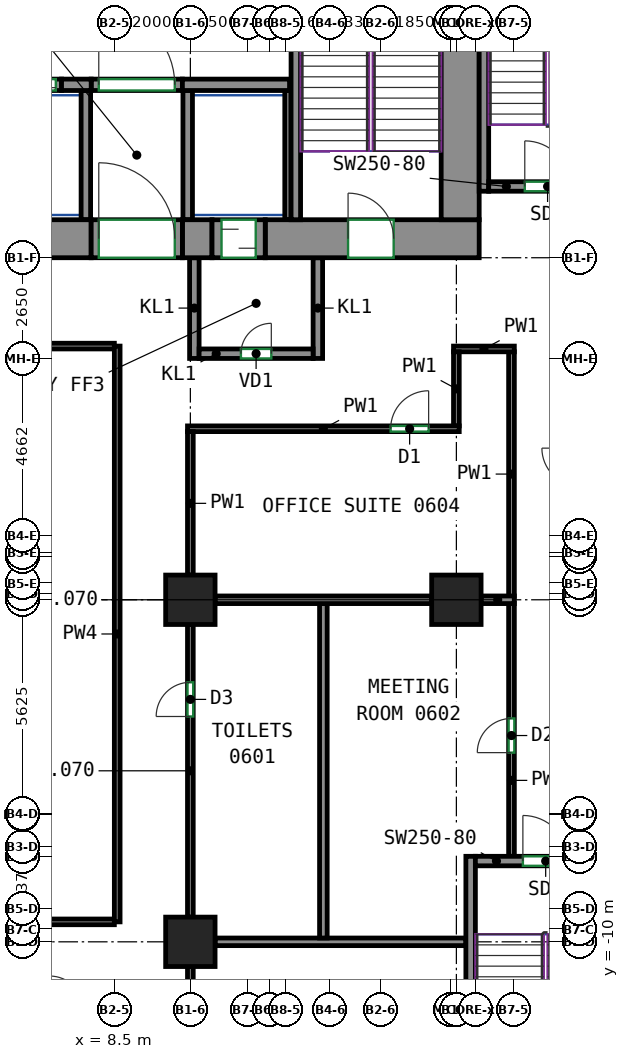
"""IFC4 building model, lengths in metres.
Left out: names, types, materials, properties, quantities, classifications, styles, units other than length and angle.
Written with IfcOpenShell. Run it as: python <this file> out.ifc"""

import sys

from ifc_helpers import new_model, si_unit, direction, frame, frame_2d, origin, origin_2d, place, context, subcontext, project, spatial, rectangle, extrude, source, transform, mapped, element, fill, save


model = new_model("IFC4")
c1 = context("Model", 3, precision=1e-05, world=origin(), true_north=direction((0.0, 1.0)))
c2 = subcontext(c1, "Body", "Model", "MODEL_VIEW")
j1 = project(units=[si_unit("LENGTHUNIT", "METRE"), si_unit("PLANEANGLEUNIT", "RADIAN")], contexts=[c1])
p1 = place(None, origin())
s1 = spatial("IfcSite", under=j1, at=p1, CompositionType="ELEMENT")
p2 = place(p1, origin())
s2 = spatial("IfcBuilding", under=s1, at=p2, CompositionType="ELEMENT")
p3 = place(p2, frame((0.0, 0.0, 31.0)))
s3 = spatial("IfcBuildingStorey", under=s2, at=p3, CompositionType="ELEMENT", Elevation=31.0)
m1 = source(origin(), c2, "Body", "SweptSolid", [
    extrude(rectangle(XDim=1.3, YDim=1.3, at=origin_2d()), origin(), (0.0, 0.0, 1.0), 3.72),
])
for number, where, z_axis, x_axis in (
    (1, (10.5, -10.0, 0.0), (0.0, 0.0, 1.0), (1.0, 0.0, 0.0)),
    (2, (10.5, -1.0, 0.0), (0.0, 0.0, 1.0), (1.0, 0.0, 0.0)),
    (3, (17.5, -1.0, 0.0), (0.0, 0.0, 1.0), (1.0, 0.0, 0.0)),
):
    element("IfcColumn", number, at=place(p3, frame(where, z_axis=z_axis, x_axis=x_axis)), inside=s3, PredefinedType="COLUMN", context=c2, shape_type="MappedRepresentation", body=[
        mapped(m1, transform((0.0, 0.0, 0.0))),
    ])
m2 = source(origin(), c2, "Body", "SweptSolid", [
    extrude(rectangle(XDim=14.18, YDim=1.0, at=frame_2d((7.09, 0.0))), origin(), (0.0, 0.0, 1.0), 3.72),
])
p4 = place(p3, frame((-6.29, 8.5, 0.0), z_axis=(0.0, 0.0, 1.0), x_axis=(1.0, 0.0, 0.0)))
e4 = element("IfcWall", 4, at=p4, inside=s3, PredefinedType="SHEAR", context=c2, shape_type="MappedRepresentation", body=[
    mapped(m2, transform((0.0, 0.0, 0.0))),
])
m3 = source(origin(), c2, "Body", "SweptSolid", [
    extrude(rectangle(XDim=0.78, YDim=1.0, at=frame_2d((0.39, 0.0))), origin(), (0.0, 0.0, 1.0), 3.72),
])
p5 = place(p3, frame((10.29, 8.5, 0.0), z_axis=(0.0, 0.0, 1.0), x_axis=(1.0, 0.0, 0.0)))
e5 = element("IfcWall", 5, at=p5, inside=s3, PredefinedType="SHEAR", context=c2, shape_type="MappedRepresentation", body=[
    mapped(m3, transform((0.0, 0.0, 0.0))),
])
m4 = source(origin(), c2, "Body", "SweptSolid", [
    extrude(rectangle(XDim=5.63, YDim=1.0, at=frame_2d((2.815, 0.0))), origin(), (0.0, 0.0, 1.0), 3.72),
])
p6 = place(p3, frame((12.47, 8.5, 0.0), z_axis=(0.0, 0.0, 1.0), x_axis=(1.0, 0.0, 0.0)))
e6 = element("IfcWall", 6, at=p6, inside=s3, PredefinedType="SHEAR", context=c2, shape_type="MappedRepresentation", body=[
    mapped(m4, transform((0.0, 0.0, 0.0))),
])
p7 = place(p6, frame((2.18, 0.0, 0.0)))
e7 = element("IfcOpeningElement", 7, at=p7, cuts=e6, PredefinedType="OPENING", context=c2, shape_type="SweptSolid", body=[
    extrude(rectangle(XDim=1.2, YDim=2.1, at=frame_2d((0.6, 1.05))), frame((0.0, 0.51, 0.0), z_axis=(0.0, -1.0, 0.0), x_axis=(1.0, 0.0, 0.0)), (0.0, 0.0, 1.0), 1.02),
])
m5 = source(origin(), c2, "Body", "SweptSolid", [
    extrude(rectangle(XDim=12.0, YDim=1.0, at=frame_2d((6.0, 0.0))), origin(), (0.0, 0.0, 1.0), 3.72),
])
p8 = place(p3, frame((17.6, 9.0, 0.0), z_axis=(0.0, 0.0, 1.0), x_axis=(0.0, 1.0, 0.0)))
e8 = element("IfcWall", 8, at=p8, inside=s3, PredefinedType="SHEAR", context=c2, shape_type="MappedRepresentation", body=[
    mapped(m5, transform((0.0, 0.0, 0.0))),
])
m6 = source(origin(), c2, "Body", "SweptSolid", [
    extrude(rectangle(XDim=7.75, YDim=0.25, at=frame_2d((3.875, 0.0))), origin(), (0.0, 0.0, 1.0), 3.72),
])
p9 = place(p3, frame((13.275, 9.0, 0.0), z_axis=(0.0, 0.0, 1.0), x_axis=(0.0, 1.0, 0.0)))
e9 = element("IfcWall", 9, at=p9, inside=s3, PredefinedType="SHEAR", context=c2, shape_type="MappedRepresentation", body=[
    mapped(m6, transform((0.0, 0.0, 0.0))),
])
m7 = source(origin(), c2, "Body", "SweptSolid", [
    extrude(rectangle(XDim=8.0, YDim=0.25, at=frame_2d((4.0, 0.0))), origin(), (0.0, 0.0, 1.0), 3.72),
])
p10 = place(p3, frame((17.875, -15.75, 0.0), z_axis=(0.0, 0.0, 1.0), x_axis=(0.0, 1.0, 0.0)))
e10 = element("IfcWall", 10, at=p10, inside=s3, PredefinedType="SHEAR", context=c2, shape_type="MappedRepresentation", body=[
    mapped(m7, transform((0.0, 0.0, 0.0))),
])
m8 = source(origin(), c2, "Body", "SweptSolid", [
    extrude(rectangle(XDim=3.7, YDim=0.25, at=frame_2d((1.85, 0.0))), origin(), (0.0, 0.0, 1.0), 3.72),
])
p11 = place(p3, frame((18.0, -7.875, 0.0), z_axis=(0.0, 0.0, 1.0), x_axis=(1.0, 0.0, 0.0)))
e11 = element("IfcWall", 11, at=p11, inside=s3, PredefinedType="SHEAR", context=c2, shape_type="MappedRepresentation", body=[
    mapped(m8, transform((0.0, 0.0, 0.0))),
])
p12 = place(p11, frame((1.25, 0.0, 0.0)))
e12 = element("IfcOpeningElement", 12, at=p12, cuts=e11, PredefinedType="OPENING", context=c2, shape_type="SweptSolid", body=[
    extrude(rectangle(XDim=1.2, YDim=2.1, at=frame_2d((0.6, 1.05))), frame((0.0, 0.135, 0.0), z_axis=(0.0, -1.0, 0.0), x_axis=(1.0, 0.0, 0.0)), (0.0, 0.0, 1.0), 0.27),
])
p13 = place(p3, frame((18.225, 9.75, 0.0), z_axis=(0.0, 0.0, 1.0), x_axis=(0.0, 1.0, 0.0)))
e13 = element("IfcWall", 13, at=p13, inside=s3, PredefinedType="SHEAR", context=c2, shape_type="MappedRepresentation", body=[
    mapped(m7, transform((0.0, 0.0, 0.0))),
])
m9 = source(origin(), c2, "Body", "SweptSolid", [
    extrude(rectangle(XDim=3.1, YDim=0.25, at=frame_2d((1.55, 0.0))), origin(), (0.0, 0.0, 1.0), 3.72),
])
p14 = place(p3, frame((18.35, 9.875, 0.0), z_axis=(0.0, 0.0, 1.0), x_axis=(1.0, 0.0, 0.0)))
e14 = element("IfcWall", 14, at=p14, inside=s3, PredefinedType="SHEAR", context=c2, shape_type="MappedRepresentation", body=[
    mapped(m9, transform((0.0, 0.0, 0.0))),
])
p15 = place(p14, frame((0.95, 0.0, 0.0)))
e15 = element("IfcOpeningElement", 15, at=p15, cuts=e14, PredefinedType="OPENING", context=c2, shape_type="SweptSolid", body=[
    extrude(rectangle(XDim=1.2, YDim=2.1, at=frame_2d((0.6, 1.05))), frame((0.0, 0.135, 0.0), z_axis=(0.0, -1.0, 0.0), x_axis=(1.0, 0.0, 0.0)), (0.0, 0.0, 1.0), 0.27),
])
m10 = source(origin(), c2, "Body", "SweptSolid", [
    extrude(rectangle(XDim=0.78, YDim=0.3, at=frame_2d((0.39, 0.0))), origin(), (0.0, 0.0, 1.0), 3.72),
])
p16 = place(p3, frame((7.11, 12.55, 0.0), z_axis=(0.0, 0.0, 1.0), x_axis=(1.0, 0.0, 0.0)))
e16 = element("IfcWall", 16, at=p16, inside=s3, PredefinedType="SHEAR", context=c2, shape_type="MappedRepresentation", body=[
    mapped(m10, transform((0.0, 0.0, 0.0))),
])
m11 = source(origin(), c2, "Body", "SweptSolid", [
    extrude(rectangle(XDim=2.82, YDim=0.3, at=frame_2d((1.41, 0.0))), origin(), (0.0, 0.0, 1.0), 3.72),
])
p17 = place(p3, frame((10.29, 12.55, 0.0), z_axis=(0.0, 0.0, 1.0), x_axis=(1.0, 0.0, 0.0)))
e17 = element("IfcWall", 17, at=p17, inside=s3, PredefinedType="SHEAR", context=c2, shape_type="MappedRepresentation", body=[
    mapped(m11, transform((0.0, 0.0, 0.0))),
])
m12 = source(origin(), c2, "Body", "SweptSolid", [
    extrude(rectangle(XDim=1.4, YDim=0.3, at=frame_2d((0.7, 0.0))), origin(), (0.0, 0.0, 1.0), 3.72),
])
p18 = place(p3, frame((5.71, 12.55, 0.0), z_axis=(0.0, 0.0, 1.0), x_axis=(1.0, 0.0, 0.0)))
e18 = element("IfcWall", 18, at=p18, inside=s3, PredefinedType="PARTITIONING", context=c2, shape_type="MappedRepresentation", body=[
    mapped(m12, transform((0.0, 0.0, 0.0))),
])
p19 = place(p18, frame((0.15, 0.0, 0.0)))
e19 = element("IfcOpeningElement", 19, at=p19, cuts=e18, PredefinedType="OPENING", context=c2, shape_type="SweptSolid", body=[
    extrude(rectangle(XDim=1.1, YDim=2.1, at=frame_2d((0.55, 1.05))), frame((0.0, 0.16, 0.0), z_axis=(0.0, -1.0, 0.0), x_axis=(1.0, 0.0, 0.0)), (0.0, 0.0, 1.0), 0.32),
])
m13 = source(origin(), c2, "Body", "SweptSolid", [
    extrude(rectangle(XDim=2.4, YDim=0.3, at=frame_2d((1.2, 0.0))), origin(), (0.0, 0.0, 1.0), 3.72),
])
p20 = place(p3, frame((7.89, 12.55, 0.0), z_axis=(0.0, 0.0, 1.0), x_axis=(1.0, 0.0, 0.0)))
e20 = element("IfcWall", 20, at=p20, inside=s3, PredefinedType="PARTITIONING", context=c2, shape_type="MappedRepresentation", body=[
    mapped(m13, transform((0.0, 0.0, 0.0))),
])
p21 = place(p20, frame((0.2, 0.0, 0.0)))
e21 = element("IfcOpeningElement", 21, at=p21, cuts=e20, PredefinedType="OPENING", context=c2, shape_type="SweptSolid", body=[
    extrude(rectangle(XDim=2.0, YDim=2.1, at=frame_2d((1.0, 1.05))), frame((0.0, 0.16, 0.0), z_axis=(0.0, -1.0, 0.0), x_axis=(1.0, 0.0, 0.0)), (0.0, 0.0, 1.0), 0.32),
])
m14 = source(origin(), c2, "Body", "SweptSolid", [
    extrude(rectangle(XDim=2.65, YDim=0.25, at=frame_2d((1.325, 0.0))), origin(), (0.0, 0.0, 1.0), 3.72),
])
for number, where, z_axis, x_axis in (
    (22, (10.605, 5.35, 0.0), (0.0, 0.0, 1.0), (0.0, 1.0, 0.0)),
    (23, (13.855, 5.35, 0.0), (0.0, 0.0, 1.0), (0.0, 1.0, 0.0)),
):
    element("IfcWall", number, at=place(p3, frame(where, z_axis=z_axis, x_axis=x_axis)), inside=s3, PredefinedType="PARTITIONING", context=c2, shape_type="MappedRepresentation", body=[
        mapped(m14, transform((0.0, 0.0, 0.0))),
    ])
m15 = source(origin(), c2, "Body", "SweptSolid", [
    extrude(rectangle(XDim=3.0, YDim=0.25, at=frame_2d((1.5, 0.0))), origin(), (0.0, 0.0, 1.0), 3.72),
])
p22 = place(p3, frame((10.73, 5.475, 0.0), z_axis=(0.0, 0.0, 1.0), x_axis=(1.0, 0.0, 0.0)))
e24 = element("IfcWall", 24, at=p22, inside=s3, PredefinedType="PARTITIONING", context=c2, shape_type="MappedRepresentation", body=[
    mapped(m15, transform((0.0, 0.0, 0.0))),
])
p23 = place(p22, frame((1.1, 0.0, 0.0)))
e25 = element("IfcOpeningElement", 25, at=p23, cuts=e24, PredefinedType="OPENING", context=c2, shape_type="SweptSolid", body=[
    extrude(rectangle(XDim=0.8, YDim=2.0, at=frame_2d((0.4, 1.0))), frame((0.0, 0.135, 0.0), z_axis=(0.0, -1.0, 0.0), x_axis=(1.0, 0.0, 0.0)), (0.0, 0.0, 1.0), 0.27),
])
m16 = source(origin(), c2, "Body", "SweptSolid", [
    extrude(rectangle(XDim=3.4, YDim=0.25, at=frame_2d((1.7, 0.0))), origin(), (0.0, 0.0, 1.0), 3.72),
])
p24 = place(p3, frame((10.43, 9.0, 0.0), z_axis=(0.0, 0.0, 1.0), x_axis=(0.0, 1.0, 0.0)))
e26 = element("IfcWall", 26, at=p24, inside=s3, PredefinedType="PARTITIONING", context=c2, shape_type="MappedRepresentation", body=[
    mapped(m16, transform((0.0, 0.0, 0.0))),
])
m17 = source(origin(), c2, "Body", "SweptSolid", [
    extrude(rectangle(XDim=3.4, YDim=0.165, at=frame_2d((1.7, 0.0))), origin(), (0.0, 0.0, 1.0), 3.72),
])
p25 = place(p3, frame((13.067, 9.0, 0.0), z_axis=(0.0, 0.0, 1.0), x_axis=(0.0, 1.0, 0.0)))
e27 = element("IfcWall", 27, at=p25, inside=s3, PredefinedType="PARTITIONING", context=c2, shape_type="MappedRepresentation", body=[
    mapped(m17, transform((0.0, 0.0, 0.0))),
])
p26 = place(p3, frame((7.75, 9.0, 0.0), z_axis=(0.0, 0.0, 1.0), x_axis=(0.0, 1.0, 0.0)))
e28 = element("IfcWall", 28, at=p26, inside=s3, PredefinedType="PARTITIONING", context=c2, shape_type="MappedRepresentation", body=[
    mapped(m16, transform((0.0, 0.0, 0.0))),
])
m18 = source(origin(), c2, "Body", "SweptSolid", [
    extrude(rectangle(XDim=2.4, YDim=1.0, at=frame_2d((1.2, 0.0))), origin(), (0.0, 0.0, 1.0), 2.7),
])
p27 = place(p3, frame((7.89, 8.5, 0.0), z_axis=(0.0, 0.0, 1.0), x_axis=(1.0, 0.0, 0.0)))
e29 = element("IfcWall", 29, at=p27, inside=s3, PredefinedType="PARTITIONING", context=c2, shape_type="MappedRepresentation", body=[
    mapped(m18, transform((0.0, 0.0, 0.0))),
])
p28 = place(p27, frame((0.2, 0.0, 0.0)))
e30 = element("IfcOpeningElement", 30, at=p28, cuts=e29, PredefinedType="OPENING", context=c2, shape_type="SweptSolid", body=[
    extrude(rectangle(XDim=2.0, YDim=2.1, at=frame_2d((1.0, 1.05))), frame((0.0, 0.51, 0.0), z_axis=(0.0, -1.0, 0.0), x_axis=(1.0, 0.0, 0.0)), (0.0, 0.0, 1.0), 1.02),
])
m19 = source(origin(), c2, "Body", "SweptSolid", [
    extrude(rectangle(XDim=1.4, YDim=1.0, at=frame_2d((0.7, 0.0))), origin(), (0.0, 0.0, 1.0), 2.7),
])
p29 = place(p3, frame((11.07, 8.5, 0.0), z_axis=(0.0, 0.0, 1.0), x_axis=(1.0, 0.0, 0.0)))
e31 = element("IfcWall", 31, at=p29, inside=s3, PredefinedType="PARTITIONING", context=c2, shape_type="MappedRepresentation", body=[
    mapped(m19, transform((0.0, 0.0, 0.0))),
])
p30 = place(p29, frame((0.25, 0.0, 0.0)))
e32 = element("IfcOpeningElement", 32, at=p30, cuts=e31, PredefinedType="OPENING", context=c2, shape_type="SweptSolid", body=[
    extrude(rectangle(XDim=0.9, YDim=2.1, at=frame_2d((0.45, 1.05))), frame((0.0, 0.51, 0.0), z_axis=(0.0, -1.0, 0.0), x_axis=(1.0, 0.0, 0.0)), (0.0, 0.0, 1.0), 1.02),
])
p31 = place(p3, frame((10.5, -11.725, 0.0), z_axis=(0.0, 0.0, 1.0), x_axis=(0.0, 1.0, 0.0)))
e33 = element("IfcWall", 33, at=p31, inside=s3, PredefinedType="PARTITIONING", context=c2, shape_type="SweptSolid", body=[
    extrude(rectangle(XDim=1.075, YDim=0.15, at=frame_2d((0.538, 0.0))), origin(), (0.0, 0.0, 1.0), 3.07),
])
p32 = place(p3, frame((10.5, -9.35, 0.0), z_axis=(0.0, 0.0, 1.0), x_axis=(0.0, 1.0, 0.0)))
e34 = element("IfcWall", 34, at=p32, inside=s3, PredefinedType="PARTITIONING", context=c2, shape_type="SweptSolid", body=[
    extrude(rectangle(XDim=7.7, YDim=0.15, at=frame_2d((3.85, 0.0))), origin(), (0.0, 0.0, 1.0), 3.07),
])
p33 = place(p32, frame((5.279, 0.0, 0.0)))
e35 = element("IfcOpeningElement", 35, at=p33, cuts=e34, PredefinedType="OPENING", context=c2, shape_type="SweptSolid", body=[
    extrude(rectangle(XDim=0.9, YDim=2.1, at=frame_2d((0.45, 1.05))), frame((0.0, 0.085, 0.0), z_axis=(0.0, -1.0, 0.0), x_axis=(1.0, 0.0, 0.0)), (0.0, 0.0, 1.0), 0.17),
])
p34 = place(p3, frame((18.95, -7.75, 0.0), z_axis=(0.0, 0.0, 1.0), x_axis=(0.0, 1.0, 0.0)))
e36 = element("IfcWall", 36, at=p34, inside=s3, PredefinedType="PARTITIONING", context=c2, shape_type="SweptSolid", body=[
    extrude(rectangle(XDim=6.66, YDim=0.15, at=frame_2d((3.33, 0.0))), origin(), (0.0, 0.0, 1.0), 3.72),
])
p35 = place(p34, frame((2.728, 0.0, 0.0)))
e37 = element("IfcOpeningElement", 37, at=p35, cuts=e36, PredefinedType="OPENING", context=c2, shape_type="SweptSolid", body=[
    extrude(rectangle(XDim=0.9, YDim=2.1, at=frame_2d((0.45, 1.05))), frame((0.0, 0.085, 0.0), z_axis=(0.0, -1.0, 0.0), x_axis=(1.0, 0.0, 0.0)), (0.0, 0.0, 1.0), 0.17),
])
p36 = place(p3, frame((18.95, -0.91, 0.0), z_axis=(0.0, 0.0, 1.0), x_axis=(0.0, 1.0, 0.0)))
e38 = element("IfcWall", 38, at=p36, inside=s3, PredefinedType="PARTITIONING", context=c2, shape_type="SweptSolid", body=[
    extrude(rectangle(XDim=6.435, YDim=0.15, at=frame_2d((3.217, 0.0))), origin(), (0.0, 0.0, 1.0), 3.72),
])
p37 = place(p3, frame((17.425, 5.6, 0.0), z_axis=(0.0, 0.0, 1.0), x_axis=(1.0, 0.0, 0.0)))
e39 = element("IfcWall", 39, at=p37, inside=s3, PredefinedType="PARTITIONING", context=c2, shape_type="SweptSolid", body=[
    extrude(rectangle(XDim=1.6, YDim=0.15, at=frame_2d((0.8, 0.0))), origin(), (0.0, 0.0, 1.0), 3.72),
])
p38 = place(p3, frame((17.5, 3.575, 0.0), z_axis=(0.0, 0.0, 1.0), x_axis=(0.0, 1.0, 0.0)))
e40 = element("IfcWall", 40, at=p38, inside=s3, PredefinedType="PARTITIONING", context=c2, shape_type="SweptSolid", body=[
    extrude(rectangle(XDim=1.95, YDim=0.15, at=frame_2d((0.975, 0.0))), origin(), (0.0, 0.0, 1.0), 3.72),
])
p39 = place(p3, frame((10.425, 3.5, 0.0), z_axis=(0.0, 0.0, 1.0), x_axis=(1.0, 0.0, 0.0)))
e41 = element("IfcWall", 41, at=p39, inside=s3, PredefinedType="PARTITIONING", context=c2, shape_type="SweptSolid", body=[
    extrude(rectangle(XDim=7.15, YDim=0.15, at=frame_2d((3.575, 0.0))), origin(), (0.0, 0.0, 1.0), 3.72),
])
p40 = place(p39, frame((5.345, 0.0, 0.0)))
e42 = element("IfcOpeningElement", 42, at=p40, cuts=e41, PredefinedType="OPENING", context=c2, shape_type="SweptSolid", body=[
    extrude(rectangle(XDim=1.0, YDim=2.1, at=frame_2d((0.5, 1.05))), frame((0.0, 0.085, 0.0), z_axis=(0.0, -1.0, 0.0), x_axis=(1.0, 0.0, 0.0)), (0.0, 0.0, 1.0), 0.17),
])
p41 = place(p3, frame((10.5, -0.35, 0.0), z_axis=(0.0, 0.0, 1.0), x_axis=(0.0, 1.0, 0.0)))
e43 = element("IfcWall", 43, at=p41, inside=s3, PredefinedType="PARTITIONING", context=c2, shape_type="SweptSolid", body=[
    extrude(rectangle(XDim=3.775, YDim=0.15, at=frame_2d((1.888, 0.0))), origin(), (0.0, 0.0, 1.0), 3.72),
])
p42 = place(p3, frame((11.15, -10.0, 0.0), z_axis=(0.0, 0.0, 1.0), x_axis=(1.0, 0.0, 0.0)))
e44 = element("IfcWall", 44, at=p42, inside=s3, PredefinedType="PARTITIONING", context=c2, shape_type="SweptSolid", body=[
    extrude(rectangle(XDim=6.6, YDim=0.2, at=frame_2d((3.3, 0.0))), origin(), (0.0, 0.0, 1.0), 3.72),
])
p43 = place(p3, frame((14.0, -9.9, 0.0), z_axis=(0.0, 0.0, 1.0), x_axis=(0.0, 1.0, 0.0)))
e45 = element("IfcWall", 45, at=p43, inside=s3, PredefinedType="PARTITIONING", context=c2, shape_type="SweptSolid", body=[
    extrude(rectangle(XDim=8.8, YDim=0.2, at=frame_2d((4.4, 0.0))), origin(), (0.0, 0.0, 1.0), 3.72),
])
p44 = place(p3, frame((11.15, -1.0, 0.0), z_axis=(0.0, 0.0, 1.0), x_axis=(1.0, 0.0, 0.0)))
e46 = element("IfcWall", 46, at=p44, inside=s3, PredefinedType="PARTITIONING", context=c2, shape_type="SweptSolid", body=[
    extrude(rectangle(XDim=5.7, YDim=0.2, at=frame_2d((2.85, 0.0))), origin(), (0.0, 0.0, 1.0), 3.72),
])
p45 = place(p3, frame((18.15, -1.0, 0.0), z_axis=(0.0, 0.0, 1.0), x_axis=(1.0, 0.0, 0.0)))
e47 = element("IfcWall", 47, at=p45, inside=s3, PredefinedType="PARTITIONING", context=c2, shape_type="SweptSolid", body=[
    extrude(rectangle(XDim=0.874, YDim=0.2, at=frame_2d((0.437, 0.0))), origin(), (0.0, 0.0, 1.0), 3.07),
])
for number, where, z_axis, x_axis in (
    (48, (8.5, -9.475, 0.0), (0.0, 0.0, 1.0), (-1.0, 0.0, 0.0)),
    (49, (-6.575, 5.675, 0.0), (0.0, 0.0, 1.0), (1.0, 0.0, 0.0)),
):
    element("IfcWall", number, at=place(p3, frame(where, z_axis=z_axis, x_axis=x_axis)), inside=s3, PredefinedType="PARTITIONING", context=c2, shape_type="SweptSolid", body=[
        extrude(rectangle(XDim=15.075, YDim=0.15, at=frame_2d((7.538, 0.0))), origin(), (0.0, 0.0, 1.0), 3.72),
    ])
p46 = place(p3, frame((8.575, 5.675, 0.0), z_axis=(0.0, 0.0, 1.0), x_axis=(0.0, -1.0, 0.0)))
e50 = element("IfcWall", 50, at=p46, inside=s3, PredefinedType="PARTITIONING", context=c2, shape_type="SweptSolid", body=[
    extrude(rectangle(XDim=15.15, YDim=0.15, at=frame_2d((7.575, 0.0))), origin(), (0.0, 0.0, 1.0), 3.72),
])
p47 = place(p21, origin())
e51 = element("IfcDoor", 51, at=p47, inside=s3, OperationType="DOUBLE_DOOR_SINGLE_SWING", PredefinedType="DOOR", context=c2, shape_type="SweptSolid", body=[
    extrude(rectangle(XDim=2.0, YDim=2.1, at=frame_2d((1.0, 1.05))), frame((0.0, 0.025, 0.0), z_axis=(0.0, -1.0, 0.0), x_axis=(1.0, 0.0, 0.0)), (0.0, 0.0, 1.0), 0.05),
])
fill(e21, e51)
p48 = place(p28, origin())
e52 = element("IfcDoor", 52, at=p48, inside=s3, OperationType="DOUBLE_DOOR_SINGLE_SWING", PredefinedType="DOOR", context=c2, shape_type="SweptSolid", body=[
    extrude(rectangle(XDim=2.0, YDim=2.1, at=frame_2d((1.0, 1.05))), frame((0.0, 0.405, 0.0), z_axis=(0.0, -1.0, 0.0), x_axis=(1.0, 0.0, 0.0)), (0.0, 0.0, 1.0), 0.05),
])
fill(e30, e52)
p49 = place(p23, origin())
e53 = element("IfcDoor", 53, at=p49, inside=s3, OperationType="SINGLE_SWING_RIGHT", PredefinedType="DOOR", context=c2, shape_type="SweptSolid", body=[
    extrude(rectangle(XDim=0.8, YDim=2.0, at=frame_2d((0.4, 1.0))), frame((0.0, 0.025, 0.0), z_axis=(0.0, -1.0, 0.0), x_axis=(1.0, 0.0, 0.0)), (0.0, 0.0, 1.0), 0.05),
])
fill(e25, e53)
p50 = place(p30, origin())
e54 = element("IfcDoor", 54, at=p50, inside=s3, OperationType="SLIDING_TO_LEFT", PredefinedType="DOOR", context=c2, shape_type="SweptSolid", body=[
    extrude(rectangle(XDim=0.9, YDim=2.1, at=frame_2d((0.45, 1.05))), frame((0.0, 0.405, 0.0), z_axis=(0.0, -1.0, 0.0), x_axis=(1.0, 0.0, 0.0)), (0.0, 0.0, 1.0), 0.05),
])
fill(e32, e54)
p51 = place(p19, origin())
e55 = element("IfcDoor", 55, at=p51, inside=s3, OperationType="DOUBLE_DOOR_SLIDING", PredefinedType="DOOR", context=c2, shape_type="SweptSolid", body=[
    extrude(rectangle(XDim=1.1, YDim=2.1, at=frame_2d((0.55, 1.05))), frame((0.0, 0.025, 0.0), z_axis=(0.0, -1.0, 0.0), x_axis=(1.0, 0.0, 0.0)), (0.0, 0.0, 1.0), 0.05),
])
fill(e19, e55)
p52 = place(p7, origin())
e56 = element("IfcDoor", 56, at=p52, inside=s3, OperationType="DOUBLE_DOOR_SINGLE_SWING", PredefinedType="DOOR", context=c2, shape_type="SweptSolid", body=[
    extrude(rectangle(XDim=1.2, YDim=2.1, at=frame_2d((0.6, 1.05))), frame((0.0, 0.405, 0.0), z_axis=(0.0, -1.0, 0.0), x_axis=(1.0, 0.0, 0.0)), (0.0, 0.0, 1.0), 0.05),
])
fill(e7, e56)
p53 = place(p12, origin())
e57 = element("IfcDoor", 57, at=p53, inside=s3, OperationType="DOUBLE_DOOR_SINGLE_SWING", PredefinedType="DOOR", context=c2, shape_type="SweptSolid", body=[
    extrude(rectangle(XDim=1.2, YDim=2.1, at=frame_2d((0.6, 1.05))), frame((0.0, 0.025, 0.0), z_axis=(0.0, -1.0, 0.0), x_axis=(1.0, 0.0, 0.0)), (0.0, 0.0, 1.0), 0.05),
])
fill(e12, e57)
p54 = place(p15, origin())
e58 = element("IfcDoor", 58, at=p54, inside=s3, OperationType="DOUBLE_DOOR_SINGLE_SWING", PredefinedType="DOOR", context=c2, shape_type="SweptSolid", body=[
    extrude(rectangle(XDim=1.2, YDim=2.1, at=frame_2d((0.6, 1.05))), frame((0.0, 0.025, 0.0), z_axis=(0.0, -1.0, 0.0), x_axis=(1.0, 0.0, 0.0)), (0.0, 0.0, 1.0), 0.05),
])
fill(e15, e58)
p55 = place(p35, origin())
e59 = element("IfcDoor", 59, at=p55, inside=s3, OperationType="SINGLE_SWING_LEFT", PredefinedType="DOOR", context=c2, shape_type="SweptSolid", body=[
    extrude(rectangle(XDim=0.9, YDim=2.1, at=frame_2d((0.45, 1.05))), frame((0.0, 0.025, 0.0), z_axis=(0.0, -1.0, 0.0), x_axis=(1.0, 0.0, 0.0)), (0.0, 0.0, 1.0), 0.05),
])
fill(e37, e59)
p56 = place(p33, origin())
e60 = element("IfcDoor", 60, at=p56, inside=s3, OperationType="SINGLE_SWING_LEFT", PredefinedType="DOOR", context=c2, shape_type="SweptSolid", body=[
    extrude(rectangle(XDim=0.9, YDim=2.1, at=frame_2d((0.45, 1.05))), frame((0.0, 0.025, 0.0), z_axis=(0.0, -1.0, 0.0), x_axis=(1.0, 0.0, 0.0)), (0.0, 0.0, 1.0), 0.05),
])
fill(e35, e60)
p57 = place(p40, origin())
e61 = element("IfcDoor", 61, at=p57, inside=s3, OperationType="SINGLE_SWING_RIGHT", PredefinedType="DOOR", context=c2, shape_type="SweptSolid", body=[
    extrude(rectangle(XDim=1.0, YDim=2.1, at=frame_2d((0.5, 1.05))), frame((0.0, 0.025, 0.0), z_axis=(0.0, -1.0, 0.0), x_axis=(1.0, 0.0, 0.0)), (0.0, 0.0, 1.0), 0.05),
])
fill(e42, e61)
save(model, sys.argv[1])
